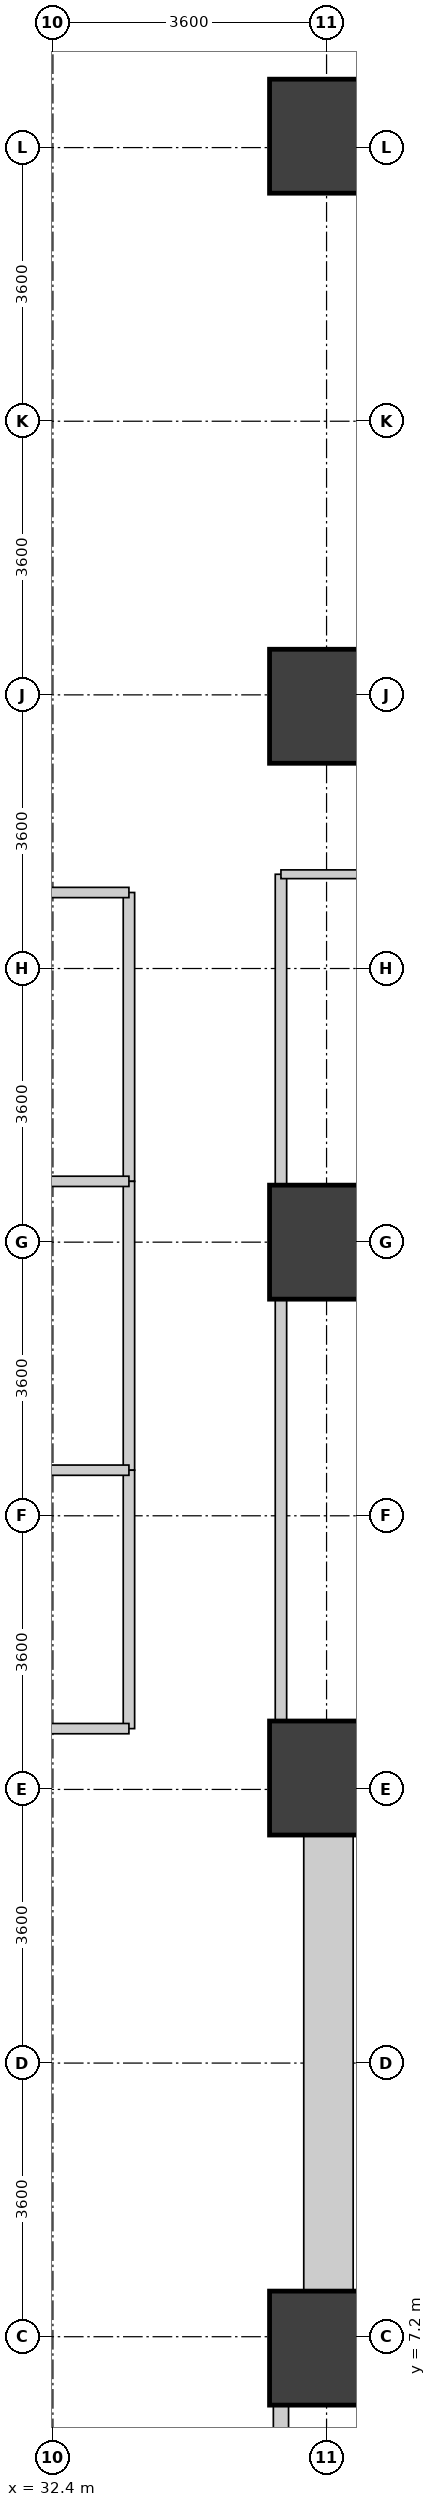
"""IFC4 building model, lengths in metres.
Left out: names, types, materials, properties, quantities, classifications, styles, units other than length and angle.
Written with IfcOpenShell. Run it as: python <this file> out.ifc"""

import sys

from ifc_helpers import new_model, si_unit, direction, frame, frame_2d, origin, origin_2d, place, context, subcontext, project, spatial, rectangle, extrude, source, transform, mapped, element, fill, save


model = new_model("IFC4")
c1 = context("Model", 3, precision=1e-05, world=origin(), true_north=direction((0.0, 1.0)))
c2 = subcontext(c1, "Body", "Model", "MODEL_VIEW")
j1 = project(units=[si_unit("LENGTHUNIT", "METRE"), si_unit("PLANEANGLEUNIT", "RADIAN")], contexts=[c1])
p1 = place(None, origin())
s1 = spatial("IfcSite", under=j1, at=p1, CompositionType="ELEMENT")
p2 = place(p1, origin())
s2 = spatial("IfcBuilding", under=s1, at=p2, CompositionType="ELEMENT")
p3 = place(p2, origin())
s3 = spatial("IfcBuildingStorey", under=s2, at=p3, CompositionType="ELEMENT", Elevation=0.0)
p4 = place(p3, frame((36.025, 6.65, 0.0), z_axis=(0.0, 0.0, 1.0), x_axis=(0.0, 1.0, 0.0)))
e1 = element("IfcWall", 1, at=p4, inside=s3, PredefinedType="SHEAR", context=c2, shape_type="SweptSolid", body=[
    extrude(rectangle(XDim=8.3, YDim=0.65, at=frame_2d((4.15, 0.0))), origin(), (0.0, 0.0, 1.0), 5.12),
])
p5 = place(p3, frame((36.35, 6.975, 0.0), z_axis=(0.0, 0.0, 1.0), x_axis=(1.0, 0.0, 0.0)))
e2 = element("IfcWall", 2, at=p5, inside=s3, PredefinedType="SHEAR", context=c2, shape_type="SweptSolid", body=[
    extrude(rectangle(XDim=3.2, YDim=0.65, at=frame_2d((1.6, 0.0))), origin(), (0.0, 0.0, 1.0), 5.12),
])
p6 = place(p5, frame((0.85, 0.0, 0.0)))
e3 = element("IfcOpeningElement", 3, at=p6, cuts=e2, PredefinedType="OPENING", context=c2, shape_type="SweptSolid", body=[
    extrude(rectangle(XDim=1.1, YDim=2.08, at=frame_2d((0.55, 1.04))), frame((0.0, 0.335, 0.0), z_axis=(0.0, -1.0, 0.0), x_axis=(1.0, 0.0, 0.0)), (0.0, 0.0, 1.0), 0.67),
])
p7 = place(p3, frame((36.35, 14.625, 0.0), z_axis=(0.0, 0.0, 1.0), x_axis=(1.0, 0.0, 0.0)))
e4 = element("IfcWall", 4, at=p7, inside=s3, PredefinedType="SHEAR", context=c2, shape_type="SweptSolid", body=[
    extrude(rectangle(XDim=3.2, YDim=0.65, at=frame_2d((1.6, 0.0))), origin(), (0.0, 0.0, 1.0), 5.12),
])
m1 = source(origin(), c2, "Body", "SweptSolid", [
    extrude(rectangle(XDim=1.5, YDim=1.5, at=origin_2d()), origin(), (0.0, 0.0, 1.0), 5.4),
])
for number, where, z_axis, x_axis in (
    (5, (36.0, 21.6, 0.0), (0.0, 0.0, 1.0), (1.0, 0.0, 0.0)),
    (6, (36.0, 28.65, 0.0), (0.0, 0.0, 1.0), (1.0, 0.0, 0.0)),
    (7, (36.0, 36.15, 0.0), (0.0, 0.0, 1.0), (1.0, 0.0, 0.0)),
    (8, (36.0, 7.05, 0.0), (0.0, 0.0, 1.0), (1.0, 0.0, 0.0)),
    (9, (36.0, 14.55, 0.0), (0.0, 0.0, 1.0), (1.0, 0.0, 0.0)),
):
    element("IfcColumn", number, at=place(p3, frame(where, z_axis=z_axis, x_axis=x_axis)), inside=s3, PredefinedType="COLUMN", context=c2, shape_type="MappedRepresentation", body=[
        mapped(m1, transform((0.0, 0.0, 0.0), x_axis=(1.0, 0.0, 0.0), y_axis=(0.0, 1.0, 0.0), z_axis=(0.0, 0.0, 1.0), scale=1.0)),
    ])
p8 = place(p3, frame((35.4, 5.1, 0.0), z_axis=(0.0, 0.0, 1.0), x_axis=(0.0, 1.0, 0.0)))
e10 = element("IfcWall", 10, at=p8, inside=s3, PredefinedType="PARTITIONING", context=c2, shape_type="SweptSolid", body=[
    extrude(rectangle(XDim=1.2, YDim=0.2, at=frame_2d((0.6, 0.0))), origin(), (0.0, 0.0, 1.0), 5.1),
])
p9 = place(p3, frame((35.4, 15.3, 0.0), z_axis=(0.0, 0.0, 1.0), x_axis=(0.0, 1.0, 0.0)))
e11 = element("IfcWall", 11, at=p9, inside=s3, PredefinedType="PARTITIONING", context=c2, shape_type="SweptSolid", body=[
    extrude(rectangle(XDim=5.55, YDim=0.15, at=frame_2d((2.775, 0.0))), origin(), (0.0, 0.0, 1.0), 5.1),
])
p10 = place(p9, frame((2.125, 0.0, 0.0)))
e12 = element("IfcOpeningElement", 12, at=p10, cuts=e11, PredefinedType="OPENING", context=c2, shape_type="SweptSolid", body=[
    extrude(rectangle(XDim=1.3, YDim=2.12, at=frame_2d((0.65, 1.06))), frame((0.0, 0.085, 0.0), z_axis=(0.0, -1.0, 0.0), x_axis=(1.0, 0.0, 0.0)), (0.0, 0.0, 1.0), 0.17),
])
p11 = place(p3, frame((35.4, 22.35, 0.0), z_axis=(0.0, 0.0, 1.0), x_axis=(0.0, 1.0, 0.0)))
e13 = element("IfcWall", 13, at=p11, inside=s3, PredefinedType="PARTITIONING", context=c2, shape_type="SweptSolid", body=[
    extrude(rectangle(XDim=4.09, YDim=0.15, at=frame_2d((2.045, 0.0))), origin(), (0.0, 0.0, 1.0), 5.1),
])
p12 = place(p3, frame((33.4, 22.4, 0.0), z_axis=(0.0, 0.0, 1.0), x_axis=(0.0, 1.0, 0.0)))
e14 = element("IfcWall", 14, at=p12, inside=s3, PredefinedType="PARTITIONING", context=c2, shape_type="SweptSolid", body=[
    extrude(rectangle(XDim=3.8, YDim=0.15, at=frame_2d((1.9, 0.0))), origin(), (0.0, 0.0, 1.0), 5.1),
])
p13 = place(p12, frame((1.475, 0.0, 0.0)))
e15 = element("IfcOpeningElement", 15, at=p13, cuts=e14, PredefinedType="OPENING", context=c2, shape_type="SweptSolid", body=[
    extrude(rectangle(XDim=0.85, YDim=2.04, at=frame_2d((0.425, 1.02))), frame((0.0, 0.085, 0.0), z_axis=(0.0, -1.0, 0.0), x_axis=(1.0, 0.0, 0.0)), (0.0, 0.0, 1.0), 0.17),
])
p14 = place(p3, frame((33.4, 18.6, 0.0), z_axis=(0.0, 0.0, 1.0), x_axis=(0.0, 1.0, 0.0)))
e16 = element("IfcWall", 16, at=p14, inside=s3, PredefinedType="PARTITIONING", context=c2, shape_type="SweptSolid", body=[
    extrude(rectangle(XDim=3.8, YDim=0.15, at=frame_2d((1.9, 0.0))), origin(), (0.0, 0.0, 1.0), 5.1),
])
p15 = place(p14, frame((1.475, 0.0, 0.0)))
e17 = element("IfcOpeningElement", 17, at=p15, cuts=e16, PredefinedType="OPENING", context=c2, shape_type="SweptSolid", body=[
    extrude(rectangle(XDim=0.85, YDim=2.04, at=frame_2d((0.425, 1.02))), frame((0.0, 0.085, 0.0), z_axis=(0.0, -1.0, 0.0), x_axis=(1.0, 0.0, 0.0)), (0.0, 0.0, 1.0), 0.17),
])
p16 = place(p3, frame((33.4, 15.2, 0.0), z_axis=(0.0, 0.0, 1.0), x_axis=(0.0, 1.0, 0.0)))
e18 = element("IfcWall", 18, at=p16, inside=s3, PredefinedType="PARTITIONING", context=c2, shape_type="SweptSolid", body=[
    extrude(rectangle(XDim=3.4, YDim=0.15, at=frame_2d((1.7, 0.0))), origin(), (0.0, 0.0, 1.0), 5.1),
])
p17 = place(p16, frame((1.175, 0.0, 0.0)))
e19 = element("IfcOpeningElement", 19, at=p17, cuts=e18, PredefinedType="OPENING", context=c2, shape_type="SweptSolid", body=[
    extrude(rectangle(XDim=1.05, YDim=2.12, at=frame_2d((0.525, 1.06))), frame((0.0, 0.085, 0.0), z_axis=(0.0, -1.0, 0.0), x_axis=(1.0, 0.0, 0.0)), (0.0, 0.0, 1.0), 0.17),
])
p18 = place(p3, frame((35.4, 26.44, 0.0), z_axis=(0.0, 0.0, 1.0), x_axis=(1.0, 0.0, 0.0)))
e20 = element("IfcWall", 20, at=p18, inside=s3, PredefinedType="PARTITIONING", context=c2, shape_type="SweptSolid", body=[
    extrude(rectangle(XDim=15.0, YDim=0.115, at=frame_2d((7.5, 0.0))), origin(), (0.0, 0.0, 1.0), 5.1),
])
for number, where, z_axis, x_axis in (
    (21, (29.64, 15.2, 0.0), (0.0, 0.0, 1.0), (1.0, 0.0, 0.0)),
    (22, (29.64, 18.6, 0.0), (0.0, 0.0, 1.0), (1.0, 0.0, 0.0)),
    (23, (29.64, 22.4, 0.0), (0.0, 0.0, 1.0), (1.0, 0.0, 0.0)),
    (24, (29.64, 26.2, 0.0), (0.0, 0.0, 1.0), (1.0, 0.0, 0.0)),
):
    element("IfcWall", number, at=place(p3, frame(where, z_axis=z_axis, x_axis=x_axis)), inside=s3, PredefinedType="PARTITIONING", context=c2, shape_type="SweptSolid", body=[
        extrude(rectangle(XDim=3.76, YDim=0.135, at=frame_2d((1.88, 0.0))), origin(), (0.0, 0.0, 1.0), 5.1),
    ])
p19 = place(p10, origin())
e25 = element("IfcDoor", 25, at=p19, inside=s3, OperationType="DOUBLE_DOOR_SINGLE_SWING", PredefinedType="DOOR", context=c2, shape_type="SweptSolid", body=[
    extrude(rectangle(XDim=1.3, YDim=2.12, at=frame_2d((0.65, 1.06))), frame((0.0, 0.025, 0.0), z_axis=(0.0, -1.0, 0.0), x_axis=(1.0, 0.0, 0.0)), (0.0, 0.0, 1.0), 0.05),
])
fill(e12, e25)
p20 = place(p13, origin())
e26 = element("IfcDoor", 26, at=p20, inside=s3, OperationType="SINGLE_SWING_LEFT", PredefinedType="DOOR", context=c2, shape_type="SweptSolid", body=[
    extrude(rectangle(XDim=0.85, YDim=2.04, at=frame_2d((0.425, 1.02))), frame((0.0, 0.025, 0.0), z_axis=(0.0, -1.0, 0.0), x_axis=(1.0, 0.0, 0.0)), (0.0, 0.0, 1.0), 0.05),
])
fill(e15, e26)
p21 = place(p15, origin())
e27 = element("IfcDoor", 27, at=p21, inside=s3, OperationType="SINGLE_SWING_RIGHT", PredefinedType="DOOR", context=c2, shape_type="SweptSolid", body=[
    extrude(rectangle(XDim=0.85, YDim=2.04, at=frame_2d((0.425, 1.02))), frame((0.0, 0.025, 0.0), z_axis=(0.0, -1.0, 0.0), x_axis=(1.0, 0.0, 0.0)), (0.0, 0.0, 1.0), 0.05),
])
fill(e17, e27)
p22 = place(p17, origin())
e28 = element("IfcDoor", 28, at=p22, inside=s3, OperationType="SINGLE_SWING_LEFT", PredefinedType="DOOR", context=c2, shape_type="SweptSolid", body=[
    extrude(rectangle(XDim=1.05, YDim=2.12, at=frame_2d((0.525, 1.06))), frame((0.0, 0.025, 0.0), z_axis=(0.0, -1.0, 0.0), x_axis=(1.0, 0.0, 0.0)), (0.0, 0.0, 1.0), 0.05),
])
fill(e19, e28)
save(model, sys.argv[1])
